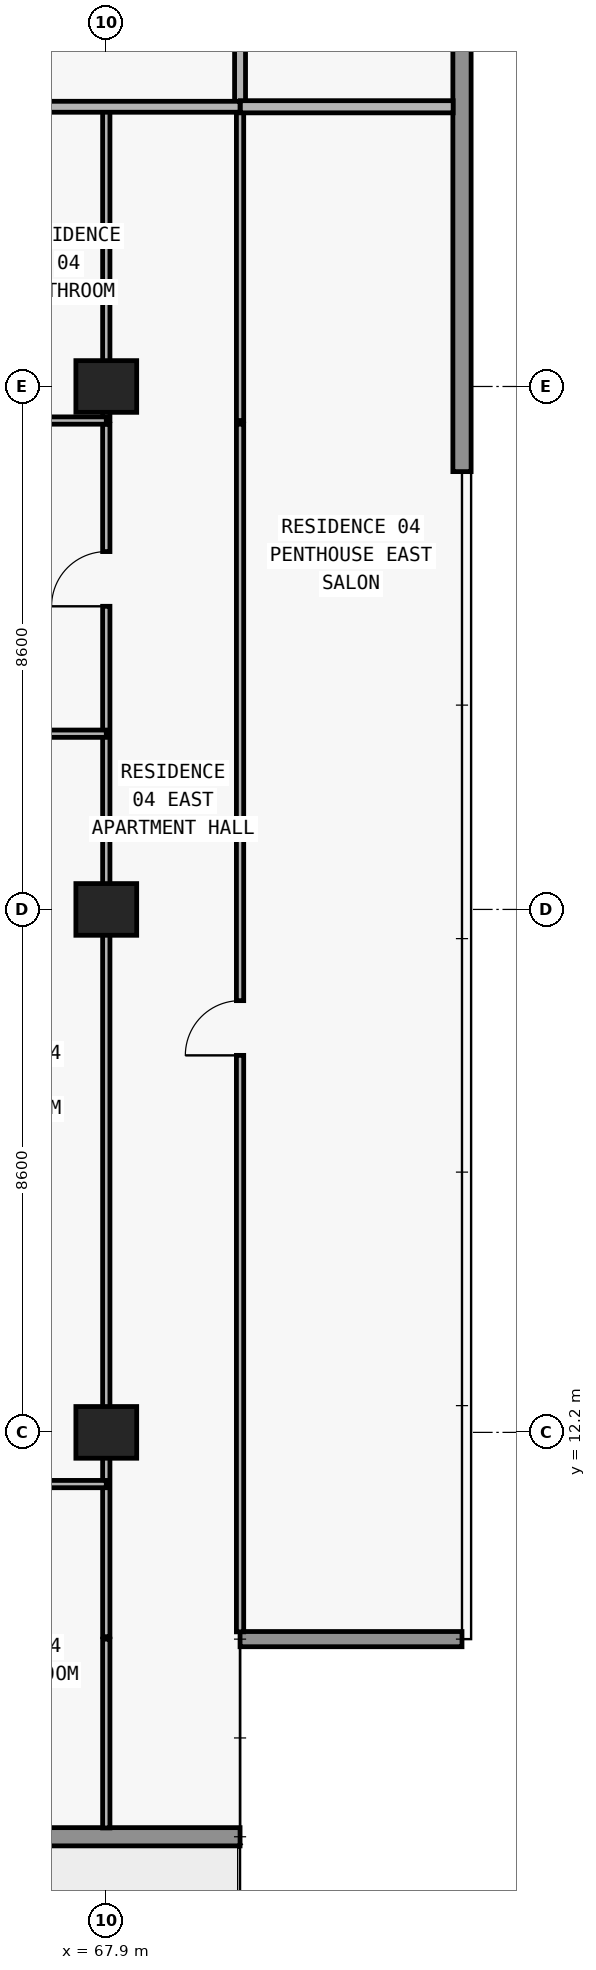
"""IFC4 building model, lengths in metres.
Left out: names, types, materials, properties, quantities, classifications, styles, units other than length and angle.
Written with IfcOpenShell. Run it as: python <this file> out.ifc"""

import sys

from ifc_helpers import new_model, si_unit, direction, frame, frame_2d, origin, origin_2d, place, context, subcontext, project, spatial, rectangle, extrude, element, fill, save


model = new_model("IFC4")
c1 = context("Model", 3, precision=1e-05, world=origin(), true_north=direction((0.0, 1.0)))
c2 = subcontext(c1, "Body", "Model", "MODEL_VIEW")
j1 = project(units=[si_unit("LENGTHUNIT", "METRE"), si_unit("PLANEANGLEUNIT", "RADIAN")], contexts=[c1])
p1 = place(None, origin())
s1 = spatial("IfcSite", under=j1, at=p1, CompositionType="ELEMENT")
p2 = place(p1, origin())
s2 = spatial("IfcBuilding", under=s1, at=p2, CompositionType="ELEMENT")
p3 = place(p2, frame((0.0, 0.0, 135.6)))
s3 = spatial("IfcBuildingStorey", under=s2, at=p3, CompositionType="ELEMENT", Elevation=135.6)
for number, where, z_axis, x_axis in (
    (1, (67.9, 12.2, 0.0), (0.0, 0.0, 1.0), (1.0, 0.0, 0.0)),
    (2, (67.9, 20.8, 0.0), (0.0, 0.0, 1.0), (1.0, 0.0, 0.0)),
    (3, (67.9, 29.4, 0.0), (0.0, 0.0, 1.0), (1.0, 0.0, 0.0)),
):
    element("IfcColumn", number, at=place(p3, frame(where, z_axis=z_axis, x_axis=x_axis)), inside=s3, PredefinedType="COLUMN", context=c2, shape_type="SweptSolid", body=[
        extrude(rectangle(XDim=1.0, YDim=0.85, at=origin_2d()), origin(), (0.0, 0.0, 1.0), 3.05),
    ])
p4 = place(p3, frame((70.1, 5.55, 0.0), z_axis=(0.0, 0.0, 1.0), x_axis=(-1.0, 0.0, 0.0)))
e4 = element("IfcWall", 4, at=p4, inside=s3, PredefinedType="STANDARD", context=c2, shape_type="SweptSolid", body=[
    extrude(rectangle(XDim=62.4, YDim=0.3, at=frame_2d((31.2, 0.0))), origin(), (0.0, 0.0, 1.0), 3.05),
])
p5 = place(p4, frame((57.29, 0.0, 0.0)))
e5 = element("IfcOpeningElement", 5, at=p5, cuts=e4, PredefinedType="OPENING", context=c2, shape_type="SweptSolid", body=[
    extrude(rectangle(XDim=2.0, YDim=2.3, at=frame_2d((1.0, 1.15))), frame((0.0, 0.16, 0.0), z_axis=(0.0, -1.0, 0.0), x_axis=(1.0, 0.0, 0.0)), (0.0, 0.0, 1.0), 0.32),
])
p6 = place(p4, frame((52.61, 0.0, 0.65)))
e6 = element("IfcOpeningElement", 6, at=p6, cuts=e4, PredefinedType="OPENING", context=c2, shape_type="SweptSolid", body=[
    extrude(rectangle(XDim=2.6, YDim=1.85, at=frame_2d((1.3, 0.925))), frame((0.0, 0.16, 0.0), z_axis=(0.0, -1.0, 0.0), x_axis=(1.0, 0.0, 0.0)), (0.0, 0.0, 1.0), 0.32),
])
p7 = place(p4, frame((46.5, 0.0, 0.85)))
e7 = element("IfcOpeningElement", 7, at=p7, cuts=e4, PredefinedType="OPENING", context=c2, shape_type="SweptSolid", body=[
    extrude(rectangle(XDim=2.2, YDim=1.55, at=frame_2d((1.1, 0.775))), frame((0.0, 0.16, 0.0), z_axis=(0.0, -1.0, 0.0), x_axis=(1.0, 0.0, 0.0)), (0.0, 0.0, 1.0), 0.32),
])
p8 = place(p4, frame((40.49, 0.0, 0.0)))
e8 = element("IfcOpeningElement", 8, at=p8, cuts=e4, PredefinedType="OPENING", context=c2, shape_type="SweptSolid", body=[
    extrude(rectangle(XDim=2.0, YDim=2.3, at=frame_2d((1.0, 1.15))), frame((0.0, 0.16, 0.0), z_axis=(0.0, -1.0, 0.0), x_axis=(1.0, 0.0, 0.0)), (0.0, 0.0, 1.0), 0.32),
])
p9 = place(p4, frame((35.81, 0.0, 0.65)))
e9 = element("IfcOpeningElement", 9, at=p9, cuts=e4, PredefinedType="OPENING", context=c2, shape_type="SweptSolid", body=[
    extrude(rectangle(XDim=2.6, YDim=1.85, at=frame_2d((1.3, 0.925))), frame((0.0, 0.16, 0.0), z_axis=(0.0, -1.0, 0.0), x_axis=(1.0, 0.0, 0.0)), (0.0, 0.0, 1.0), 0.32),
])
p10 = place(p4, frame((30.1, 0.0, 0.85)))
e10 = element("IfcOpeningElement", 10, at=p10, cuts=e4, PredefinedType="OPENING", context=c2, shape_type="SweptSolid", body=[
    extrude(rectangle(XDim=2.2, YDim=1.55, at=frame_2d((1.1, 0.775))), frame((0.0, 0.16, 0.0), z_axis=(0.0, -1.0, 0.0), x_axis=(1.0, 0.0, 0.0)), (0.0, 0.0, 1.0), 0.32),
])
p11 = place(p4, frame((22.1, 0.0, 0.85)))
e11 = element("IfcOpeningElement", 11, at=p11, cuts=e4, PredefinedType="OPENING", context=c2, shape_type="SweptSolid", body=[
    extrude(rectangle(XDim=2.2, YDim=1.55, at=frame_2d((1.1, 0.775))), frame((0.0, 0.16, 0.0), z_axis=(0.0, -1.0, 0.0), x_axis=(1.0, 0.0, 0.0)), (0.0, 0.0, 1.0), 0.32),
])
p12 = place(p4, frame((16.026, 0.0, 0.0)))
e12 = element("IfcOpeningElement", 12, at=p12, cuts=e4, PredefinedType="OPENING", context=c2, shape_type="SweptSolid", body=[
    extrude(rectangle(XDim=2.0, YDim=2.3, at=frame_2d((1.0, 1.15))), frame((0.0, 0.16, 0.0), z_axis=(0.0, -1.0, 0.0), x_axis=(1.0, 0.0, 0.0)), (0.0, 0.0, 1.0), 0.32),
])
p13 = place(p4, frame((11.726, 0.0, 0.85)))
e13 = element("IfcOpeningElement", 13, at=p13, cuts=e4, PredefinedType="OPENING", context=c2, shape_type="SweptSolid", body=[
    extrude(rectangle(XDim=2.2, YDim=1.55, at=frame_2d((1.1, 0.775))), frame((0.0, 0.16, 0.0), z_axis=(0.0, -1.0, 0.0), x_axis=(1.0, 0.0, 0.0)), (0.0, 0.0, 1.0), 0.32),
])
p14 = place(p4, frame((7.29, 0.0, 0.0)))
e14 = element("IfcOpeningElement", 14, at=p14, cuts=e4, PredefinedType="OPENING", context=c2, shape_type="SweptSolid", body=[
    extrude(rectangle(XDim=2.0, YDim=2.3, at=frame_2d((1.0, 1.15))), frame((0.0, 0.16, 0.0), z_axis=(0.0, -1.0, 0.0), x_axis=(1.0, 0.0, 0.0)), (0.0, 0.0, 1.0), 0.32),
])
p15 = place(p4, frame((3.19, 0.0, 0.85)))
e15 = element("IfcOpeningElement", 15, at=p15, cuts=e4, PredefinedType="OPENING", context=c2, shape_type="SweptSolid", body=[
    extrude(rectangle(XDim=1.8, YDim=1.55, at=frame_2d((0.9, 0.775))), frame((0.0, 0.16, 0.0), z_axis=(0.0, -1.0, 0.0), x_axis=(1.0, 0.0, 0.0)), (0.0, 0.0, 1.0), 0.32),
])
p16 = place(p3, frame((70.1, 8.8, 0.0), z_axis=(0.0, 0.0, 1.0), x_axis=(1.0, 0.0, 0.0)))
e16 = element("IfcWall", 16, at=p16, inside=s3, PredefinedType="ELEMENTEDWALL", context=c2, shape_type="SweptSolid", body=[
    extrude(rectangle(XDim=3.65, YDim=0.25, at=frame_2d((1.825, 0.0))), origin(), (0.0, 0.0, 1.0), 3.05),
])
p17 = place(p3, frame((73.75, 47.2, 0.0), z_axis=(0.0, 0.0, 1.0), x_axis=(0.0, -1.0, 0.0)))
e17 = element("IfcWall", 17, at=p17, inside=s3, PredefinedType="STANDARD", context=c2, shape_type="SweptSolid", body=[
    extrude(rectangle(XDim=19.2, YDim=0.3, at=frame_2d((9.6, 0.0))), origin(), (0.0, 0.0, 1.0), 3.05),
])
p18 = place(p3, frame((67.9, 5.695, 0.0), z_axis=(0.0, 0.0, 1.0), x_axis=(0.0, 1.0, 0.0)))
e18 = element("IfcWall", 18, at=p18, inside=s3, PredefinedType="PARTITIONING", context=c2, shape_type="SweptSolid", body=[
    extrude(rectangle(XDim=3.105, YDim=0.12, at=frame_2d((1.552, 0.0))), origin(), (0.0, 0.0, 1.0), 3.05),
])
p19 = place(p3, frame((67.9, 8.84, 0.0), z_axis=(0.0, 0.0, 1.0), x_axis=(0.0, 1.0, 0.0)))
e19 = element("IfcWall", 19, at=p19, inside=s3, PredefinedType="PARTITIONING", context=c2, shape_type="SweptSolid", body=[
    extrude(rectangle(XDim=19.94, YDim=0.12, at=frame_2d((9.97, 0.0))), origin(), (0.0, 0.0, 1.0), 2.174),
])
p20 = place(p19, frame((16.945, 0.0, 0.0)))
e20 = element("IfcOpeningElement", 20, at=p20, cuts=e19, PredefinedType="OPENING", context=c2, shape_type="SweptSolid", body=[
    extrude(rectangle(XDim=0.9, YDim=2.124, at=frame_2d((0.45, 1.062))), frame((0.0, 0.07, 0.0), z_axis=(0.0, -1.0, 0.0), x_axis=(1.0, 0.0, 0.0)), (0.0, 0.0, 1.0), 0.14),
])
p21 = place(p3, frame((67.9, 28.84, 0.0), z_axis=(0.0, 0.0, 1.0), x_axis=(0.0, 1.0, 0.0)))
e21 = element("IfcWall", 21, at=p21, inside=s3, PredefinedType="PARTITIONING", context=c2, shape_type="SweptSolid", body=[
    extrude(rectangle(XDim=5.16, YDim=0.12, at=frame_2d((2.58, 0.0))), origin(), (0.0, 0.0, 1.0), 2.174),
])
p22 = place(p3, frame((70.1, 8.92, 0.0), z_axis=(0.0, 0.0, 1.0), x_axis=(0.0, 1.0, 0.0)))
e22 = element("IfcWall", 22, at=p22, inside=s3, PredefinedType="PARTITIONING", context=c2, shape_type="SweptSolid", body=[
    extrude(rectangle(XDim=19.86, YDim=0.12, at=frame_2d((9.93, 0.0))), origin(), (0.0, 0.0, 1.0), 3.05),
])
p23 = place(p22, frame((9.48, 0.0, 0.0)))
e23 = element("IfcOpeningElement", 23, at=p23, cuts=e22, PredefinedType="OPENING", context=c2, shape_type="SweptSolid", body=[
    extrude(rectangle(XDim=0.9, YDim=2.15, at=frame_2d((0.45, 1.075))), frame((0.0, 0.07, 0.0), z_axis=(0.0, -1.0, 0.0), x_axis=(1.0, 0.0, 0.0)), (0.0, 0.0, 1.0), 0.14),
])
p24 = place(p3, frame((70.1, 28.84, 0.0), z_axis=(0.0, 0.0, 1.0), x_axis=(0.0, 1.0, 0.0)))
e24 = element("IfcWall", 24, at=p24, inside=s3, PredefinedType="PARTITIONING", context=c2, shape_type="SweptSolid", body=[
    extrude(rectangle(XDim=5.16, YDim=0.12, at=frame_2d((2.58, 0.0))), origin(), (0.0, 0.0, 1.0), 3.05),
])
p25 = place(p3, frame((70.1, 34.005, 0.0), z_axis=(0.0, 0.0, 1.0), x_axis=(0.0, 1.0, 0.0)))
e25 = element("IfcWall", 25, at=p25, inside=s3, PredefinedType="PARTITIONING", context=c2, shape_type="SweptSolid", body=[
    extrude(rectangle(XDim=2.945, YDim=0.18, at=frame_2d((1.473, 0.0))), origin(), (0.0, 0.0, 1.0), 3.05),
])
p26 = place(p3, frame((64.12, 11.35, 0.0), z_axis=(0.0, 0.0, 1.0), x_axis=(1.0, 0.0, 0.0)))
e26 = element("IfcWall", 26, at=p26, inside=s3, PredefinedType="PARTITIONING", context=c2, shape_type="SweptSolid", body=[
    extrude(rectangle(XDim=3.78, YDim=0.12, at=frame_2d((1.89, 0.0))), origin(), (0.0, 0.0, 1.0), 3.05),
])
p27 = place(p26, frame((1.44, 0.0, 0.0)))
e27 = element("IfcOpeningElement", 27, at=p27, cuts=e26, PredefinedType="OPENING", context=c2, shape_type="SweptSolid", body=[
    extrude(rectangle(XDim=0.9, YDim=2.15, at=frame_2d((0.45, 1.075))), frame((0.0, 0.07, 0.0), z_axis=(0.0, -1.0, 0.0), x_axis=(1.0, 0.0, 0.0)), (0.0, 0.0, 1.0), 0.14),
])
p28 = place(p3, frame((59.55, 23.69, 0.0), z_axis=(0.0, 0.0, 1.0), x_axis=(1.0, 0.0, 0.0)))
e28 = element("IfcWall", 28, at=p28, inside=s3, PredefinedType="PARTITIONING", context=c2, shape_type="SweptSolid", body=[
    extrude(rectangle(XDim=8.35, YDim=0.12, at=frame_2d((4.175, 0.0))), origin(), (0.0, 0.0, 1.0), 3.05),
])
p29 = place(p28, frame((1.668, 0.0, 0.0)))
e29 = element("IfcOpeningElement", 29, at=p29, cuts=e28, PredefinedType="OPENING", context=c2, shape_type="SweptSolid", body=[
    extrude(rectangle(XDim=0.9, YDim=2.15, at=frame_2d((0.45, 1.075))), frame((0.0, 0.07, 0.0), z_axis=(0.0, -1.0, 0.0), x_axis=(1.0, 0.0, 0.0)), (0.0, 0.0, 1.0), 0.14),
])
p30 = place(p28, frame((6.01, 0.0, 0.0)))
e30 = element("IfcOpeningElement", 30, at=p30, cuts=e28, PredefinedType="OPENING", context=c2, shape_type="SweptSolid", body=[
    extrude(rectangle(XDim=0.9, YDim=2.15, at=frame_2d((0.45, 1.075))), frame((0.0, 0.07, 0.0), z_axis=(0.0, -1.0, 0.0), x_axis=(1.0, 0.0, 0.0)), (0.0, 0.0, 1.0), 0.14),
])
p31 = place(p3, frame((59.55, 28.84, 0.0), z_axis=(0.0, 0.0, 1.0), x_axis=(1.0, 0.0, 0.0)))
e31 = element("IfcWall", 31, at=p31, inside=s3, PredefinedType="PARTITIONING", context=c2, shape_type="SweptSolid", body=[
    extrude(rectangle(XDim=8.35, YDim=0.12, at=frame_2d((4.175, 0.0))), origin(), (0.0, 0.0, 1.0), 3.05),
])
p32 = place(p31, frame((1.668, 0.0, 0.0)))
e32 = element("IfcOpeningElement", 32, at=p32, cuts=e31, PredefinedType="OPENING", context=c2, shape_type="SweptSolid", body=[
    extrude(rectangle(XDim=0.9, YDim=2.15, at=frame_2d((0.45, 1.075))), frame((0.0, 0.07, 0.0), z_axis=(0.0, -1.0, 0.0), x_axis=(1.0, 0.0, 0.0)), (0.0, 0.0, 1.0), 0.14),
])
p33 = place(p3, frame((59.55, 34.0, 0.0), z_axis=(0.0, 0.0, 1.0), x_axis=(1.0, 0.0, 0.0)))
e33 = element("IfcWall", 33, at=p33, inside=s3, PredefinedType="PARTITIONING", context=c2, shape_type="SweptSolid", body=[
    extrude(rectangle(XDim=10.55, YDim=0.18, at=frame_2d((5.275, 0.0))), origin(), (0.0, 0.0, 1.0), 3.05),
])
p34 = place(p33, frame((2.677, 0.0, 0.0)))
e34 = element("IfcOpeningElement", 34, at=p34, cuts=e33, PredefinedType="OPENING", context=c2, shape_type="SweptSolid", body=[
    extrude(rectangle(XDim=1.0, YDim=2.2, at=frame_2d((0.5, 1.1))), frame((0.0, 0.1, 0.0), z_axis=(0.0, -1.0, 0.0), x_axis=(1.0, 0.0, 0.0)), (0.0, 0.0, 1.0), 0.2),
])
p35 = place(p3, frame((70.105, 34.0, 0.0), z_axis=(0.0, 0.0, 1.0), x_axis=(1.0, 0.0, 0.0)))
e35 = element("IfcWall", 35, at=p35, inside=s3, PredefinedType="PARTITIONING", context=c2, shape_type="SweptSolid", body=[
    extrude(rectangle(XDim=3.5, YDim=0.2, at=frame_2d((1.75, 0.0))), origin(), (0.0, 0.0, 1.0), 3.05),
])
p36 = place(p20, origin())
e36 = element("IfcDoor", 36, at=p36, inside=s3, OperationType="SINGLE_SWING_LEFT", PredefinedType="DOOR", context=c2, shape_type="SweptSolid", body=[
    extrude(rectangle(XDim=0.9, YDim=2.124, at=frame_2d((0.45, 1.062))), frame((0.0, 0.025, 0.0), z_axis=(0.0, -1.0, 0.0), x_axis=(1.0, 0.0, 0.0)), (0.0, 0.0, 1.0), 0.05),
])
fill(e20, e36)
p37 = place(p23, origin())
e37 = element("IfcDoor", 37, at=p37, inside=s3, OperationType="SINGLE_SWING_LEFT", PredefinedType="DOOR", context=c2, shape_type="SweptSolid", body=[
    extrude(rectangle(XDim=0.9, YDim=2.15, at=frame_2d((0.45, 1.075))), frame((0.0, 0.025, 0.0), z_axis=(0.0, -1.0, 0.0), x_axis=(1.0, 0.0, 0.0)), (0.0, 0.0, 1.0), 0.05),
])
fill(e23, e37)
save(model, sys.argv[1])
